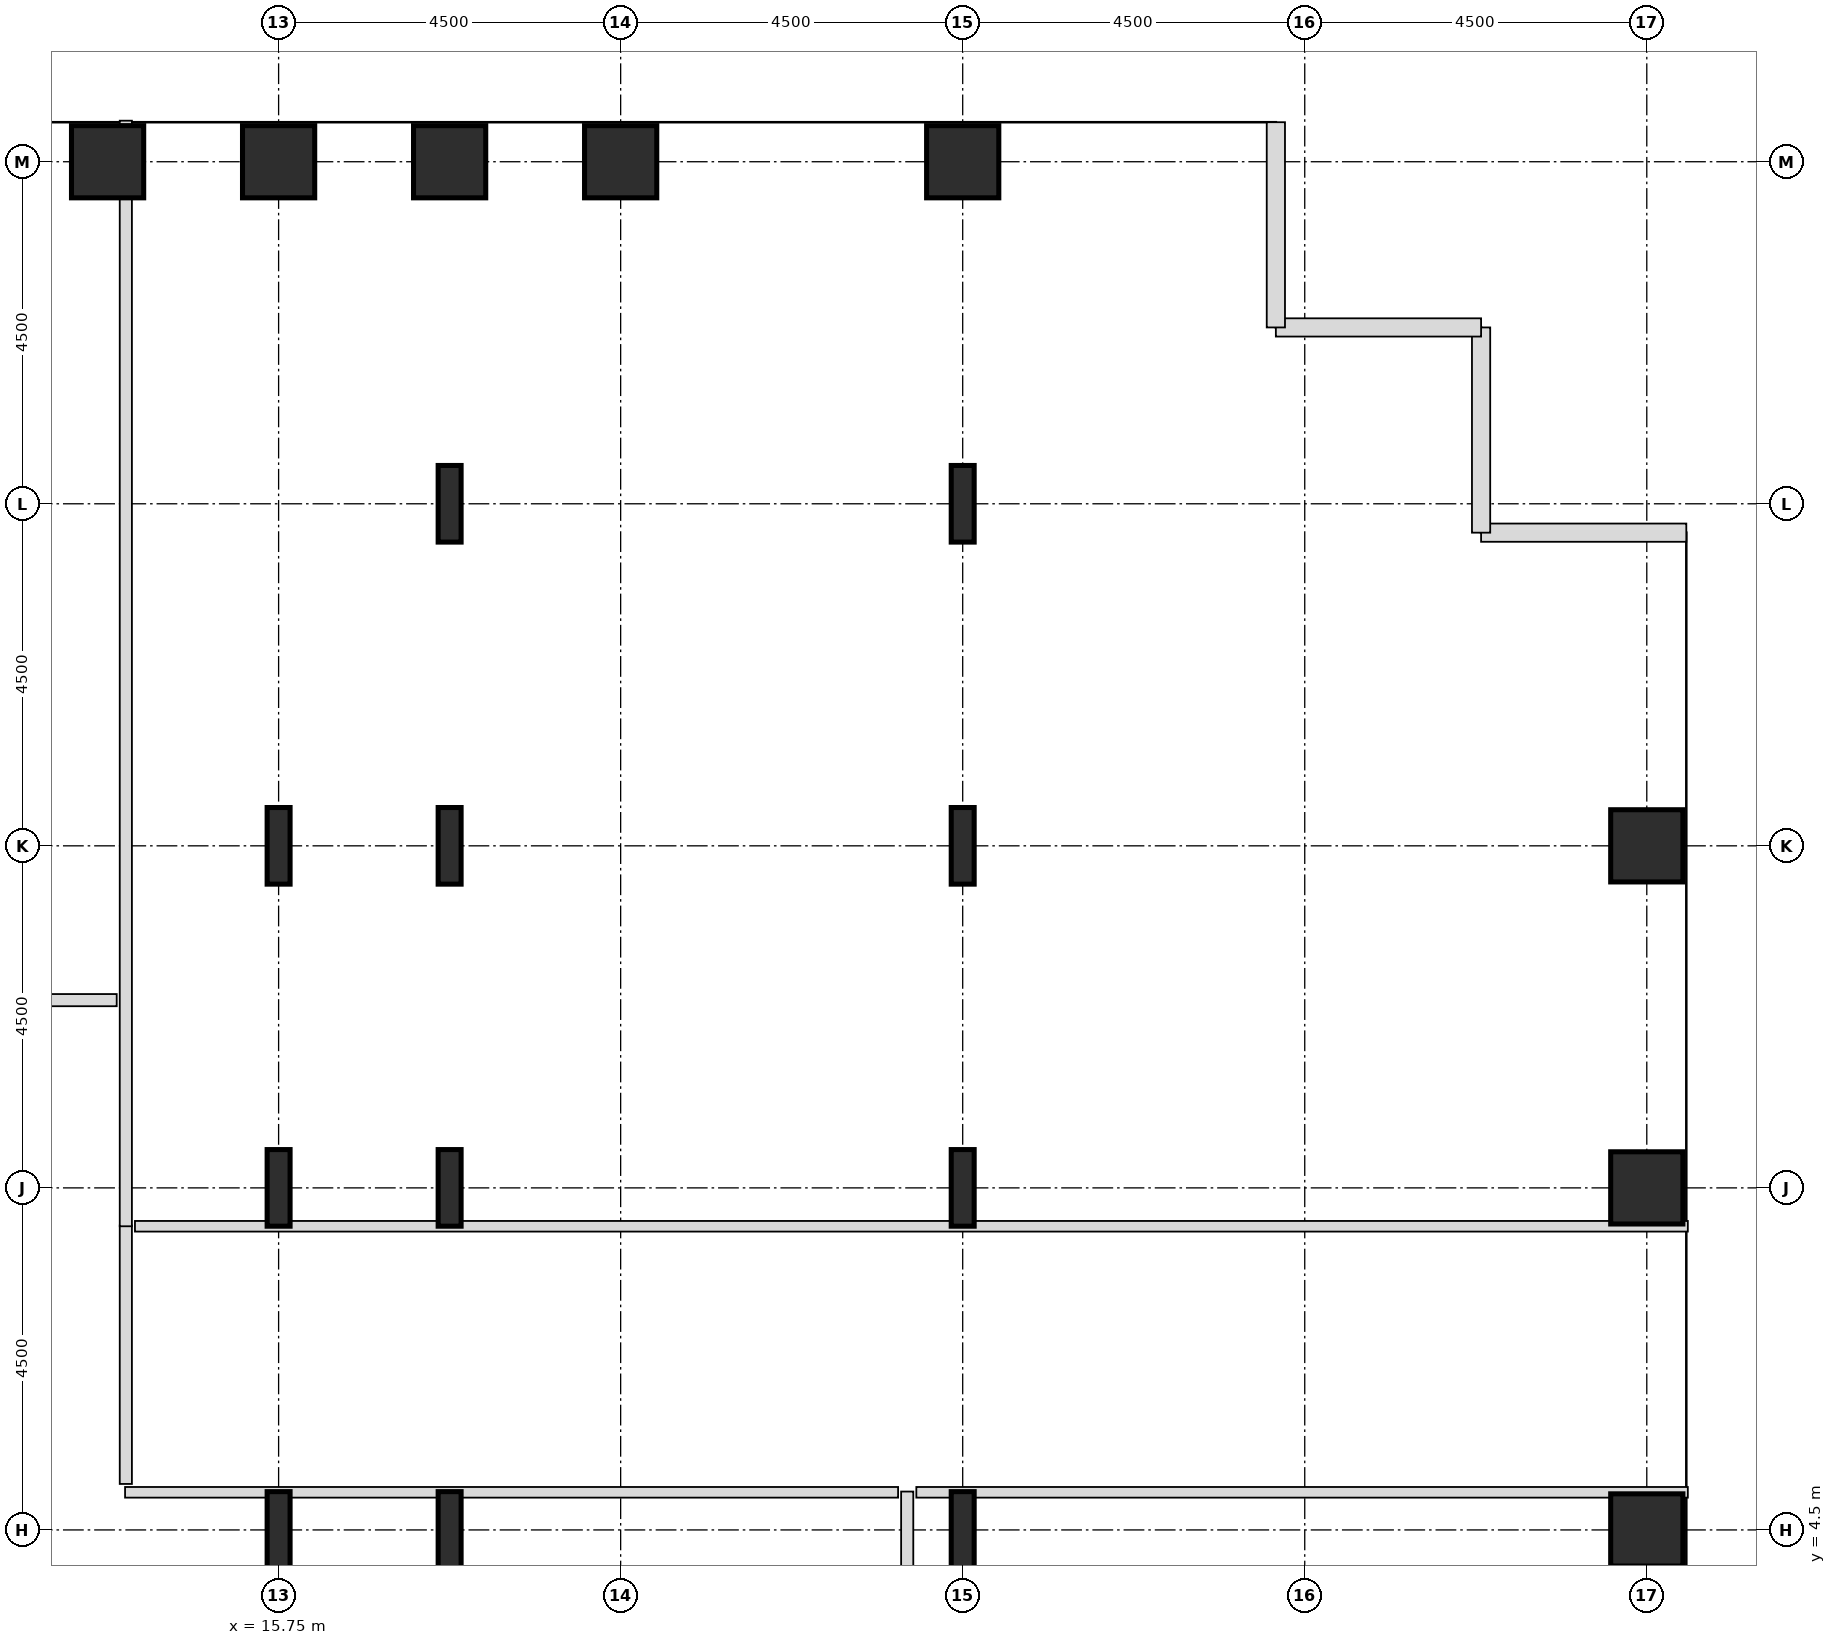
"""IFC4 building model, lengths in metres.
Left out: names, types, materials, properties, quantities, classifications, styles, units other than length and angle.
Written with IfcOpenShell. Run it as: python <this file> out.ifc"""

import sys

from ifc_helpers import new_model, si_unit, direction, frame, frame_2d, origin, origin_2d, place, context, subcontext, project, spatial, rectangle, hollow_rectangle, i_section, extrude, source, transform, mapped, element, fill, save


model = new_model("IFC4")
c1 = context("Model", 3, precision=1e-05, world=origin(), true_north=direction((0.0, 1.0)))
c2 = subcontext(c1, "Body", "Model", "MODEL_VIEW")
j1 = project(units=[si_unit("LENGTHUNIT", "METRE"), si_unit("PLANEANGLEUNIT", "RADIAN")], contexts=[c1])
p1 = place(None, origin())
s1 = spatial("IfcSite", under=j1, at=p1, CompositionType="ELEMENT")
p2 = place(p1, origin())
s2 = spatial("IfcBuilding", under=s1, at=p2, CompositionType="ELEMENT")
p3 = place(p2, frame((0.0, 0.0, 40.6)))
s3 = spatial("IfcBuildingStorey", under=s2, at=p3, CompositionType="ELEMENT", Elevation=40.6)
m1 = source(origin(), c2, "Body", "SweptSolid", [
    extrude(hollow_rectangle(XDim=0.95, YDim=0.95, WallThickness=0.045, InnerFilletRadius=0.045, OuterFilletRadius=0.09, at=origin_2d()), origin(), (0.0, 0.0, 1.0), 3.8),
])
p4 = place(p3, frame((13.5, 22.5, 0.0), z_axis=(0.0, 0.0, 1.0), x_axis=(1.0, 0.0, 0.0)))
e1 = element("IfcColumn", 1, at=p4, inside=s3, PredefinedType="COLUMN", context=c2, shape_type="MappedRepresentation", body=[
    mapped(m1, transform((0.0, 0.0, 0.0), x_axis=(1.0, 0.0, 0.0), y_axis=(0.0, 1.0, 0.0), z_axis=(0.0, 0.0, 1.0), scale=1.0)),
])
m2 = source(origin(), c2, "Body", "SweptSolid", [
    extrude(i_section(OverallWidth=0.302, OverallDepth=1.008, WebThickness=0.021, FlangeThickness=0.04, FilletRadius=0.03, at=origin_2d()), origin(), (0.0, 0.0, 1.0), 3.8),
])
for number, where, z_axis, x_axis in (
    (2, (15.75, 4.5, 0.0), (0.0, 0.0, 1.0), (1.0, 0.0, 0.0)),
    (3, (15.75, 9.0, 0.0), (0.0, 0.0, 1.0), (1.0, 0.0, 0.0)),
    (4, (15.75, 13.5, 0.0), (0.0, 0.0, 1.0), (1.0, 0.0, 0.0)),
):
    element("IfcColumn", number, at=place(p3, frame(where, z_axis=z_axis, x_axis=x_axis)), inside=s3, PredefinedType="COLUMN", context=c2, shape_type="MappedRepresentation", body=[
        mapped(m2, transform((0.0, 0.0, 0.0), x_axis=(1.0, 0.0, 0.0), y_axis=(0.0, 1.0, 0.0), z_axis=(0.0, 0.0, 1.0), scale=1.0)),
    ])
p5 = place(p3, frame((15.75, 22.5, 0.0), z_axis=(0.0, 0.0, 1.0), x_axis=(1.0, 0.0, 0.0)))
e5 = element("IfcColumn", 5, at=p5, inside=s3, PredefinedType="COLUMN", context=c2, shape_type="MappedRepresentation", body=[
    mapped(m1, transform((0.0, 0.0, 0.0), x_axis=(1.0, 0.0, 0.0), y_axis=(0.0, 1.0, 0.0), z_axis=(0.0, 0.0, 1.0), scale=1.0)),
])
for number, where, z_axis, x_axis in (
    (6, (18.0, 4.5, 0.0), (0.0, 0.0, 1.0), (1.0, 0.0, 0.0)),
    (7, (18.0, 9.0, 0.0), (0.0, 0.0, 1.0), (1.0, 0.0, 0.0)),
    (8, (18.0, 13.5, 0.0), (0.0, 0.0, 1.0), (1.0, 0.0, 0.0)),
    (9, (18.0, 18.0, 0.0), (0.0, 0.0, 1.0), (1.0, 0.0, 0.0)),
):
    element("IfcColumn", number, at=place(p3, frame(where, z_axis=z_axis, x_axis=x_axis)), inside=s3, PredefinedType="COLUMN", context=c2, shape_type="MappedRepresentation", body=[
        mapped(m2, transform((0.0, 0.0, 0.0), x_axis=(1.0, 0.0, 0.0), y_axis=(0.0, 1.0, 0.0), z_axis=(0.0, 0.0, 1.0), scale=1.0)),
    ])
for number, where, z_axis, x_axis in (
    (10, (18.0, 22.5, 0.0), (0.0, 0.0, 1.0), (1.0, 0.0, 0.0)),
    (11, (20.25, 22.5, 0.0), (0.0, 0.0, 1.0), (1.0, 0.0, 0.0)),
):
    element("IfcColumn", number, at=place(p3, frame(where, z_axis=z_axis, x_axis=x_axis)), inside=s3, PredefinedType="COLUMN", context=c2, shape_type="MappedRepresentation", body=[
        mapped(m1, transform((0.0, 0.0, 0.0), x_axis=(1.0, 0.0, 0.0), y_axis=(0.0, 1.0, 0.0), z_axis=(0.0, 0.0, 1.0), scale=1.0)),
    ])
for number, where, z_axis, x_axis in (
    (12, (24.75, 4.5, 0.0), (0.0, 0.0, 1.0), (1.0, 0.0, 0.0)),
    (13, (24.75, 9.0, 0.0), (0.0, 0.0, 1.0), (1.0, 0.0, 0.0)),
    (14, (24.75, 13.5, 0.0), (0.0, 0.0, 1.0), (1.0, 0.0, 0.0)),
    (15, (24.75, 18.0, 0.0), (0.0, 0.0, 1.0), (1.0, 0.0, 0.0)),
):
    element("IfcColumn", number, at=place(p3, frame(where, z_axis=z_axis, x_axis=x_axis)), inside=s3, PredefinedType="COLUMN", context=c2, shape_type="MappedRepresentation", body=[
        mapped(m2, transform((0.0, 0.0, 0.0), x_axis=(1.0, 0.0, 0.0), y_axis=(0.0, 1.0, 0.0), z_axis=(0.0, 0.0, 1.0), scale=1.0)),
    ])
for number, where, z_axis, x_axis in (
    (16, (24.75, 22.5, 0.0), (0.0, 0.0, 1.0), (1.0, 0.0, 0.0)),
    (17, (33.75, 4.5, 0.0), (0.0, 0.0, 1.0), (1.0, 0.0, 0.0)),
    (18, (33.75, 9.0, 0.0), (0.0, 0.0, 1.0), (1.0, 0.0, 0.0)),
    (19, (33.75, 13.5, 0.0), (0.0, 0.0, 1.0), (1.0, 0.0, 0.0)),
):
    element("IfcColumn", number, at=place(p3, frame(where, z_axis=z_axis, x_axis=x_axis)), inside=s3, PredefinedType="COLUMN", context=c2, shape_type="MappedRepresentation", body=[
        mapped(m1, transform((0.0, 0.0, 0.0), x_axis=(1.0, 0.0, 0.0), y_axis=(0.0, 1.0, 0.0), z_axis=(0.0, 0.0, 1.0), scale=1.0)),
    ])
m3 = source(origin(), c2, "Body", "SweptSolid", [
    extrude(rectangle(XDim=2.7, YDim=0.24, at=frame_2d((1.35, 0.0))), origin(), (0.0, 0.0, 1.0), 3.55),
])
for number, where, z_axis, x_axis in (
    (20, (34.27, 17.62, 0.0), (0.0, 0.0, 1.0), (-1.0, 0.0, 0.0)),
    (21, (31.57, 17.62, 0.0), (0.0, 0.0, 1.0), (0.0, 1.0, 0.0)),
    (22, (31.57, 20.32, 0.0), (0.0, 0.0, 1.0), (-1.0, 0.0, 0.0)),
):
    element("IfcWall", number, at=place(p3, frame(where, z_axis=z_axis, x_axis=x_axis)), inside=s3, PredefinedType="SHEAR", context=c2, shape_type="MappedRepresentation", body=[
        mapped(m3, transform((0.0, 0.0, 0.0), x_axis=(1.0, 0.0, 0.0), y_axis=(0.0, 1.0, 0.0), z_axis=(0.0, 0.0, 1.0), scale=1.0)),
    ])
p6 = place(p3, frame((28.87, 20.32, 0.0), z_axis=(0.0, 0.0, 1.0), x_axis=(0.0, 1.0, 0.0)))
e23 = element("IfcWall", 23, at=p6, inside=s3, PredefinedType="SHEAR", context=c2, shape_type="MappedRepresentation", body=[
    mapped(m3, transform((0.0, 0.0, 0.0), x_axis=(1.0, 0.0, 0.0), y_axis=(0.0, 1.0, 0.0), z_axis=(0.0, 0.0, 1.0), scale=1.0)),
])
p7 = place(p6, frame((0.75, 0.0, 0.85)))
e24 = element("IfcOpeningElement", 24, at=p7, cuts=e23, PredefinedType="OPENING", context=c2, shape_type="SweptSolid", body=[
    extrude(rectangle(XDim=1.2, YDim=1.8, at=frame_2d((0.6, 0.9))), frame((0.0, 0.13, 0.0), z_axis=(0.0, -1.0, 0.0), x_axis=(1.0, 0.0, 0.0)), (0.0, 0.0, 1.0), 0.26),
])
m4 = source(origin(), c2, "Body", "SweptSolid", [
    extrude(rectangle(XDim=9.7, YDim=0.16, at=frame_2d((4.85, 0.0))), origin(), (0.0, 0.0, 1.0), 3.535),
])
p8 = place(p3, frame((24.02, -4.695, 0.0), z_axis=(0.0, 0.0, 1.0), x_axis=(0.0, 1.0, 0.0)))
e25 = element("IfcWall", 25, at=p8, inside=s3, PredefinedType="PARTITIONING", context=c2, shape_type="MappedRepresentation", body=[
    mapped(m4, transform((0.0, 0.0, 0.0), x_axis=(1.0, 0.0, 0.0), y_axis=(0.0, 1.0, 0.0), z_axis=(0.0, 0.0, 1.0), scale=1.0)),
])
p9 = place(p8, frame((6.47, 0.0, 0.0)))
e26 = element("IfcOpeningElement", 26, at=p9, cuts=e25, PredefinedType="OPENING", context=c2, shape_type="SweptSolid", body=[
    extrude(rectangle(XDim=0.95, YDim=2.1, at=frame_2d((0.475, 1.05))), frame((0.0, 0.09, 0.0), z_axis=(0.0, -1.0, 0.0), x_axis=(1.0, 0.0, 0.0)), (0.0, 0.0, 1.0), 0.18),
])
m5 = source(origin(), c2, "Body", "SweptSolid", [
    extrude(rectangle(XDim=10.17, YDim=0.14, at=frame_2d((5.085, 0.0))), origin(), (0.0, 0.0, 1.0), 2.825),
])
p10 = place(p3, frame((13.73, 4.995, 0.0), z_axis=(0.0, 0.0, 1.0), x_axis=(1.0, 0.0, 0.0)))
e27 = element("IfcWall", 27, at=p10, inside=s3, PredefinedType="PARTITIONING", context=c2, shape_type="MappedRepresentation", body=[
    mapped(m5, transform((0.0, 0.0, 0.0), x_axis=(1.0, 0.0, 0.0), y_axis=(0.0, 1.0, 0.0), z_axis=(0.0, 0.0, 1.0), scale=1.0)),
])
m6 = source(origin(), c2, "Body", "SweptSolid", [
    extrude(rectangle(XDim=10.15, YDim=0.14, at=frame_2d((5.075, 0.0))), origin(), (0.0, 0.0, 1.0), 2.825),
])
p11 = place(p3, frame((24.14, 4.995, 0.0), z_axis=(0.0, 0.0, 1.0), x_axis=(1.0, 0.0, 0.0)))
e28 = element("IfcWall", 28, at=p11, inside=s3, PredefinedType="PARTITIONING", context=c2, shape_type="MappedRepresentation", body=[
    mapped(m6, transform((0.0, 0.0, 0.0), x_axis=(1.0, 0.0, 0.0), y_axis=(0.0, 1.0, 0.0), z_axis=(0.0, 0.0, 1.0), scale=1.0)),
])
m7 = source(origin(), c2, "Body", "SweptSolid", [
    extrude(rectangle(XDim=3.4, YDim=0.16, at=frame_2d((1.7, 0.0))), origin(), (0.0, 0.0, 1.0), 3.535),
])
p12 = place(p3, frame((13.74, 5.105, 0.0), z_axis=(0.0, 0.0, 1.0), x_axis=(0.0, 1.0, 0.0)))
e29 = element("IfcWall", 29, at=p12, inside=s3, PredefinedType="PARTITIONING", context=c2, shape_type="MappedRepresentation", body=[
    mapped(m7, transform((0.0, 0.0, 0.0), x_axis=(1.0, 0.0, 0.0), y_axis=(0.0, 1.0, 0.0), z_axis=(0.0, 0.0, 1.0), scale=1.0)),
])
p13 = place(p12, frame((1.225, 0.0, 0.0)))
e30 = element("IfcOpeningElement", 30, at=p13, cuts=e29, PredefinedType="OPENING", context=c2, shape_type="SweptSolid", body=[
    extrude(rectangle(XDim=0.95, YDim=2.1, at=frame_2d((0.475, 1.05))), frame((0.0, 0.09, 0.0), z_axis=(0.0, -1.0, 0.0), x_axis=(1.0, 0.0, 0.0)), (0.0, 0.0, 1.0), 0.18),
])
m8 = source(origin(), c2, "Body", "SweptSolid", [
    extrude(rectangle(XDim=20.43, YDim=0.14, at=frame_2d((10.215, 0.0))), origin(), (0.0, 0.0, 1.0), 2.825),
])
p14 = place(p3, frame((13.86, 8.495, 0.0), z_axis=(0.0, 0.0, 1.0), x_axis=(1.0, 0.0, 0.0)))
e31 = element("IfcWall", 31, at=p14, inside=s3, PredefinedType="PARTITIONING", context=c2, shape_type="MappedRepresentation", body=[
    mapped(m8, transform((0.0, 0.0, 0.0), x_axis=(1.0, 0.0, 0.0), y_axis=(0.0, 1.0, 0.0), z_axis=(0.0, 0.0, 1.0), scale=1.0)),
])
m9 = source(origin(), c2, "Body", "SweptSolid", [
    extrude(rectangle(XDim=14.545, YDim=0.16, at=frame_2d((7.272, 0.0))), origin(), (0.0, 0.0, 1.0), 3.535),
])
p15 = place(p3, frame((13.74, 8.495, 0.0), z_axis=(0.0, 0.0, 1.0), x_axis=(0.0, 1.0, 0.0)))
e32 = element("IfcWall", 32, at=p15, inside=s3, PredefinedType="PARTITIONING", context=c2, shape_type="MappedRepresentation", body=[
    mapped(m9, transform((0.0, 0.0, 0.0), x_axis=(1.0, 0.0, 0.0), y_axis=(0.0, 1.0, 0.0), z_axis=(0.0, 0.0, 1.0), scale=1.0)),
])
p16 = place(p15, frame((1.032, 0.0, 0.0)))
e33 = element("IfcOpeningElement", 33, at=p16, cuts=e32, PredefinedType="OPENING", context=c2, shape_type="SweptSolid", body=[
    extrude(rectangle(XDim=0.95, YDim=2.1, at=frame_2d((0.475, 1.05))), frame((0.0, 0.09, 0.0), z_axis=(0.0, -1.0, 0.0), x_axis=(1.0, 0.0, 0.0)), (0.0, 0.0, 1.0), 0.18),
])
m10 = source(origin(), c2, "Body", "SweptSolid", [
    extrude(rectangle(XDim=5.425, YDim=0.16, at=frame_2d((2.712, 0.0))), origin(), (0.0, 0.0, 1.0), 3.535),
])
p17 = place(p3, frame((8.195, 11.47, 0.0), z_axis=(0.0, 0.0, 1.0), x_axis=(1.0, 0.0, 0.0)))
e34 = element("IfcWall", 34, at=p17, inside=s3, PredefinedType="PARTITIONING", context=c2, shape_type="MappedRepresentation", body=[
    mapped(m10, transform((0.0, 0.0, 0.0), x_axis=(1.0, 0.0, 0.0), y_axis=(0.0, 1.0, 0.0), z_axis=(0.0, 0.0, 1.0), scale=1.0)),
])
p18 = place(p17, frame((2.238, 0.0, 0.0)))
e35 = element("IfcOpeningElement", 35, at=p18, cuts=e34, PredefinedType="OPENING", context=c2, shape_type="SweptSolid", body=[
    extrude(rectangle(XDim=0.95, YDim=2.1, at=frame_2d((0.475, 1.05))), frame((0.0, 0.09, 0.0), z_axis=(0.0, -1.0, 0.0), x_axis=(1.0, 0.0, 0.0)), (0.0, 0.0, 1.0), 0.18),
])
m11 = source(origin(), c2, "Body", "SweptSolid", [
    extrude(rectangle(XDim=1.2, YDim=1.8, at=frame_2d((0.6, 0.9))), frame((0.0, 0.03, 0.0), z_axis=(0.0, -1.0, 0.0), x_axis=(1.0, 0.0, 0.0)), (0.0, 0.0, 1.0), 0.06),
])
p19 = place(p7, origin())
e36 = element("IfcWindow", 36, at=p19, inside=s3, PartitioningType="SINGLE_PANEL", PredefinedType="WINDOW", context=c2, shape_type="MappedRepresentation", body=[
    mapped(m11, transform((0.0, 0.0, 0.0), x_axis=(1.0, 0.0, 0.0), y_axis=(0.0, 1.0, 0.0), z_axis=(0.0, 0.0, 1.0), scale=1.0)),
])
fill(e24, e36)
m12 = source(origin(), c2, "Body", "SweptSolid", [
    extrude(rectangle(XDim=0.95, YDim=2.1, at=frame_2d((0.475, 1.05))), frame((0.0, 0.025, 0.0), z_axis=(0.0, -1.0, 0.0), x_axis=(1.0, 0.0, 0.0)), (0.0, 0.0, 1.0), 0.05),
])
p20 = place(p13, origin())
e37 = element("IfcDoor", 37, at=p20, inside=s3, OperationType="SINGLE_SWING_LEFT", PredefinedType="DOOR", context=c2, shape_type="MappedRepresentation", body=[
    mapped(m12, transform((0.0, 0.0, 0.0), x_axis=(1.0, 0.0, 0.0), y_axis=(0.0, 1.0, 0.0), z_axis=(0.0, 0.0, 1.0), scale=1.0)),
])
fill(e30, e37)
p21 = place(p16, origin())
e38 = element("IfcDoor", 38, at=p21, inside=s3, OperationType="SINGLE_SWING_RIGHT", PredefinedType="DOOR", context=c2, shape_type="MappedRepresentation", body=[
    mapped(m12, transform((0.0, 0.0, 0.0), x_axis=(1.0, 0.0, 0.0), y_axis=(0.0, 1.0, 0.0), z_axis=(0.0, 0.0, 1.0), scale=1.0)),
])
fill(e33, e38)
save(model, sys.argv[1])
